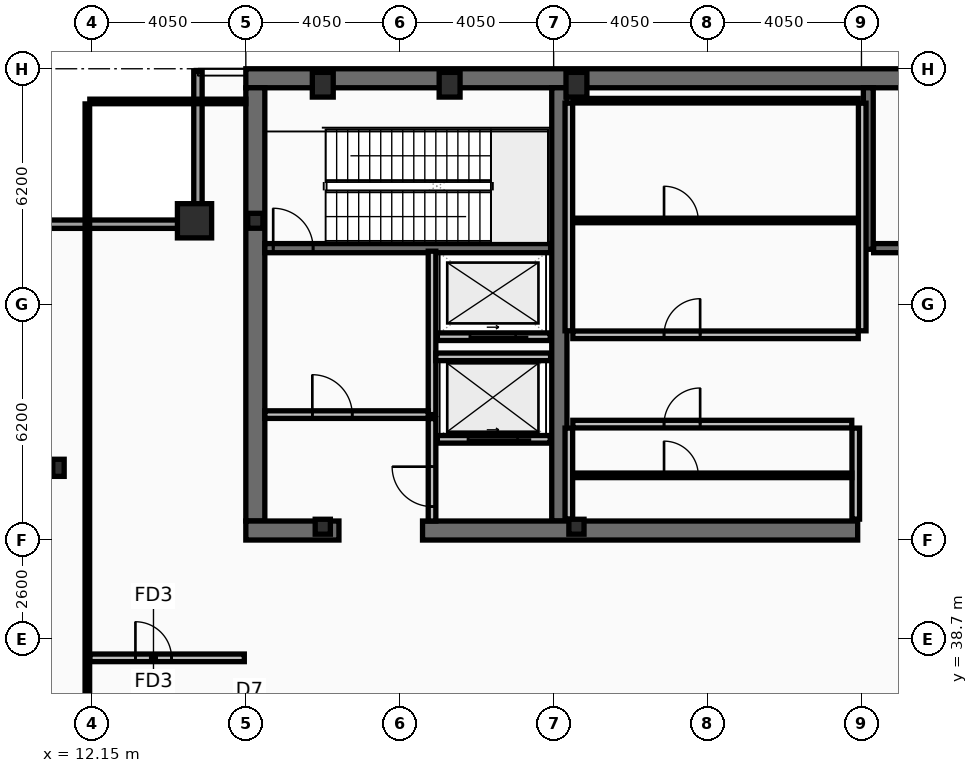
"""IFC4 building model, lengths in metres.
Left out: names, types, materials, properties, quantities, classifications, styles, units other than length and angle.
Written with IfcOpenShell. Run it as: python <this file> out.ifc"""

import sys

from ifc_helpers import new_model, si_unit, direction, frame, frame_2d, origin, origin_2d, place, context, subcontext, project, spatial, rectangle, hollow_rectangle, i_section, extrude, element, fill, save


model = new_model("IFC4")
c1 = context("Model", 3, precision=1e-05, world=origin(), true_north=direction((0.0, 1.0)))
c2 = subcontext(c1, "Body", "Model", "MODEL_VIEW")
j1 = project(units=[si_unit("LENGTHUNIT", "METRE"), si_unit("PLANEANGLEUNIT", "RADIAN")], contexts=[c1])
p1 = place(None, origin())
s1 = spatial("IfcSite", under=j1, at=p1, CompositionType="ELEMENT")
p2 = place(p1, origin())
s2 = spatial("IfcBuilding", under=s1, at=p2, CompositionType="ELEMENT")
p3 = place(p2, frame((0.0, 0.0, 350.6)))
s3 = spatial("IfcBuildingStorey", under=s2, at=p3, CompositionType="ELEMENT", Elevation=350.6)
p4 = place(p3, frame((16.2, 53.45, 0.0), z_axis=(0.0, 0.0, 1.0), x_axis=(1.0, 0.0, 0.0)))
e1 = element("IfcWall", 1, at=p4, inside=s3, PredefinedType="SHEAR", context=c2, shape_type="SweptSolid", body=[
    extrude(rectangle(XDim=40.5, YDim=0.5, at=frame_2d((20.25, 0.0))), origin(), (0.0, 0.0, 1.0), 5.4),
])
p5 = place(p3, frame((16.45, 41.8, 0.0), z_axis=(0.0, 0.0, 1.0), x_axis=(0.0, 1.0, 0.0)))
e2 = element("IfcWall", 2, at=p5, inside=s3, PredefinedType="SHEAR", context=c2, shape_type="SweptSolid", body=[
    extrude(rectangle(XDim=11.4, YDim=0.5, at=frame_2d((5.7, 0.0))), origin(), (0.0, 0.0, 1.0), 5.4),
])
p6 = place(p3, frame((24.45, 41.8, 0.0), z_axis=(0.0, 0.0, 1.0), x_axis=(0.0, 1.0, 0.0)))
e3 = element("IfcWall", 3, at=p6, inside=s3, PredefinedType="SHEAR", context=c2, shape_type="SweptSolid", body=[
    extrude(rectangle(XDim=11.4, YDim=0.4, at=frame_2d((5.7, 0.0))), origin(), (0.0, 0.0, 1.0), 5.4),
])
p7 = place(p3, frame((18.65, 41.55, 0.0), z_axis=(0.0, 0.0, 1.0), x_axis=(-1.0, 0.0, 0.0)))
e4 = element("IfcWall", 4, at=p7, inside=s3, PredefinedType="SHEAR", context=c2, shape_type="SweptSolid", body=[
    extrude(rectangle(XDim=2.45, YDim=0.5, at=frame_2d((1.225, 0.0))), origin(), (0.0, 0.0, 1.0), 5.4),
])
p8 = place(p3, frame((32.3, 41.55, 0.0), z_axis=(0.0, 0.0, 1.0), x_axis=(-1.0, 0.0, 0.0)))
e5 = element("IfcWall", 5, at=p8, inside=s3, PredefinedType="SHEAR", context=c2, shape_type="SweptSolid", body=[
    extrude(rectangle(XDim=11.45, YDim=0.5, at=frame_2d((5.725, 0.0))), origin(), (0.0, 0.0, 1.0), 5.4),
])
p9 = place(p3, frame((32.58, 48.95, 0.0), z_axis=(0.0, 0.0, 1.0), x_axis=(0.0, 1.0, 0.0)))
e6 = element("IfcWall", 6, at=p9, inside=s3, PredefinedType="SHEAR", context=c2, shape_type="SweptSolid", body=[
    extrude(rectangle(XDim=4.25, YDim=0.26, at=frame_2d((2.125, 0.0))), origin(), (0.0, 0.0, 1.0), 5.4),
])
p10 = place(p3, frame((16.7, 48.98, 0.0), z_axis=(0.0, 0.0, 1.0), x_axis=(1.0, 0.0, 0.0)))
e7 = element("IfcWall", 7, at=p10, inside=s3, PredefinedType="SHEAR", context=c2, shape_type="SweptSolid", body=[
    extrude(rectangle(XDim=7.52, YDim=0.24, at=frame_2d((3.76, 0.0))), origin(), (0.0, 0.0, 1.0), 5.4),
])
p11 = place(p10, frame((0.22, 0.0, 0.0)))
e8 = element("IfcOpeningElement", 8, at=p11, cuts=e7, PredefinedType="OPENING", context=c2, shape_type="SweptSolid", body=[
    extrude(rectangle(XDim=1.05, YDim=2.15, at=frame_2d((0.525, 1.075))), frame((0.0, 0.13, 0.0), z_axis=(0.0, -1.0, 0.0), x_axis=(1.0, 0.0, 0.0)), (0.0, 0.0, 1.0), 0.26),
])
p12 = place(p3, frame((32.72, 48.98, 0.0), z_axis=(0.0, 0.0, 1.0), x_axis=(1.0, 0.0, 0.0)))
e9 = element("IfcWall", 9, at=p12, inside=s3, PredefinedType="SHEAR", context=c2, shape_type="SweptSolid", body=[
    extrude(rectangle(XDim=7.56, YDim=0.24, at=frame_2d((3.78, 0.0))), origin(), (0.0, 0.0, 1.0), 5.4),
])
p13 = place(p12, frame((1.4, 0.0, 0.0)))
e10 = element("IfcOpeningElement", 10, at=p13, cuts=e9, PredefinedType="OPENING", context=c2, shape_type="SweptSolid", body=[
    extrude(rectangle(XDim=0.95, YDim=2.1, at=frame_2d((0.475, 1.05))), frame((0.0, 0.13, 0.0), z_axis=(0.0, -1.0, 0.0), x_axis=(1.0, 0.0, 0.0)), (0.0, 0.0, 1.0), 0.26),
])
p14 = place(p3, frame((14.85, 49.7, 0.0), z_axis=(0.0, 0.0, 1.0), x_axis=(1.0, 0.0, 0.0)))
e11 = element("IfcColumn", 11, at=p14, inside=s3, PredefinedType="COLUMN", context=c2, shape_type="SweptSolid", body=[
    extrude(hollow_rectangle(XDim=0.9, YDim=0.9, WallThickness=0.05, at=origin_2d()), origin(), (0.0, 0.0, 1.0), 5.6),
])
for number, where, z_axis, x_axis in (
    (12, (18.225, 53.28, 0.0), (0.0, 0.0, 1.0), (1.0, 0.0, 0.0)),
    (13, (21.562, 53.28, 0.0), (0.0, 0.0, 1.0), (1.0, 0.0, 0.0)),
    (14, (24.9, 53.28, 0.0), (0.0, 0.0, 1.0), (1.0, 0.0, 0.0)),
):
    element("IfcColumn", number, at=place(p3, frame(where, z_axis=z_axis, x_axis=x_axis)), inside=s3, PredefinedType="COLUMN", context=c2, shape_type="SweptSolid", body=[
        extrude(hollow_rectangle(XDim=0.55, YDim=0.65, WallThickness=0.04, at=origin_2d()), origin(), (0.0, 0.0, 1.0), 5.6),
    ])
p15 = place(p3, frame((11.27, 43.2, 0.0), z_axis=(0.0, 0.0, 1.0), x_axis=(1.0, 0.0, 0.0)))
e15 = element("IfcColumn", 15, at=p15, inside=s3, PredefinedType="COLUMN", context=c2, shape_type="SweptSolid", body=[
    extrude(i_section(OverallWidth=0.3, OverallDepth=0.45, WebThickness=0.014, FlangeThickness=0.026, at=origin_2d()), origin(), (0.0, 0.0, 1.0), 5.6),
])
for number, where, z_axis, x_axis in (
    (16, (16.45, 49.7, 0.0), (0.0, 0.0, 1.0), (1.0, 0.0, 0.0)),
    (17, (18.225, 41.65, 0.0), (0.0, 0.0, 1.0), (1.0, 0.0, 0.0)),
    (18, (24.9, 41.65, 0.0), (0.0, 0.0, 1.0), (1.0, 0.0, 0.0)),
):
    element("IfcColumn", number, at=place(p3, frame(where, z_axis=z_axis, x_axis=x_axis)), inside=s3, PredefinedType="COLUMN", context=c2, shape_type="SweptSolid", body=[
        extrude(i_section(OverallWidth=0.399, OverallDepth=0.393, WebThickness=0.023, FlangeThickness=0.037, at=origin_2d()), origin(), (0.0, 0.0, 1.0), 5.6),
    ])
p16 = place(p3, frame((10.92, 49.61, 0.0), z_axis=(0.0, 0.0, 1.0), x_axis=(1.0, 0.0, 0.0)))
e19 = element("IfcWall", 19, at=p16, inside=s3, PredefinedType="SOLIDWALL", context=c2, shape_type="SweptSolid", body=[
    extrude(rectangle(XDim=4.13, YDim=0.22, at=frame_2d((2.065, 0.0))), origin(), (0.0, 0.0, 1.0), 4.84),
])
p17 = place(p3, frame((14.94, 49.72, 0.0), z_axis=(0.0, 0.0, 1.0), x_axis=(0.0, 1.0, 0.0)))
e20 = element("IfcWall", 20, at=p17, inside=s3, PredefinedType="SOLIDWALL", context=c2, shape_type="SweptSolid", body=[
    extrude(rectangle(XDim=3.91, YDim=0.22, at=frame_2d((1.955, 0.0))), origin(), (0.0, 0.0, 1.0), 4.84),
])
p18 = place(p3, frame((24.21, 43.95, 0.0), z_axis=(0.0, 0.0, 1.0), x_axis=(-1.0, 0.0, 0.0)))
e21 = element("IfcWall", 21, at=p18, inside=s3, PredefinedType="PARTITIONING", context=c2, shape_type="SweptSolid", body=[
    extrude(rectangle(XDim=2.97, YDim=0.2, at=frame_2d((1.485, 0.0))), origin(), (0.0, 0.0, 1.0), 5.4),
])
p19 = place(p18, frame((0.86, 0.0, 0.0)))
e22 = element("IfcOpeningElement", 22, at=p19, cuts=e21, PredefinedType="OPENING", context=c2, shape_type="SweptSolid", body=[
    extrude(rectangle(XDim=1.3, YDim=2.18, at=frame_2d((0.65, 1.09))), frame((0.0, 0.11, 0.0), z_axis=(0.0, -1.0, 0.0), x_axis=(1.0, 0.0, 0.0)), (0.0, 0.0, 1.0), 0.22),
])
p20 = place(p3, frame((24.21, 46.65, 0.0), z_axis=(0.0, 0.0, 1.0), x_axis=(-1.0, 0.0, 0.0)))
e23 = element("IfcWall", 23, at=p20, inside=s3, PredefinedType="PARTITIONING", context=c2, shape_type="SweptSolid", body=[
    extrude(rectangle(XDim=2.97, YDim=0.2, at=frame_2d((1.485, 0.0))), origin(), (0.0, 0.0, 1.0), 5.4),
])
p21 = place(p20, frame((0.91, 0.0, 0.0)))
e24 = element("IfcOpeningElement", 24, at=p21, cuts=e23, PredefinedType="OPENING", context=c2, shape_type="SweptSolid", body=[
    extrude(rectangle(XDim=1.2, YDim=2.18, at=frame_2d((0.6, 1.09))), frame((0.0, 0.11, 0.0), z_axis=(0.0, -1.0, 0.0), x_axis=(1.0, 0.0, 0.0)), (0.0, 0.0, 1.0), 0.22),
])
p22 = place(p3, frame((21.1, 44.6, 0.0), z_axis=(0.0, 0.0, 1.0), x_axis=(0.0, 1.0, 0.0)))
e25 = element("IfcWall", 25, at=p22, inside=s3, PredefinedType="PARTITIONING", context=c2, shape_type="SweptSolid", body=[
    extrude(rectangle(XDim=4.3, YDim=0.2, at=frame_2d((2.15, 0.0))), origin(), (0.0, 0.0, 1.0), 5.4),
])
p23 = place(p3, frame((16.7, 44.6, 0.0), z_axis=(0.0, 0.0, 1.0), x_axis=(1.0, 0.0, 0.0)))
e26 = element("IfcWall", 26, at=p23, inside=s3, PredefinedType="PARTITIONING", context=c2, shape_type="SweptSolid", body=[
    extrude(rectangle(XDim=4.3, YDim=0.2, at=frame_2d((2.15, 0.0))), origin(), (0.0, 0.0, 1.0), 5.4),
])
p24 = place(p23, frame((1.25, 0.0, 0.0)))
e27 = element("IfcOpeningElement", 27, at=p24, cuts=e26, PredefinedType="OPENING", context=c2, shape_type="SweptSolid", body=[
    extrude(rectangle(XDim=1.05, YDim=2.15, at=frame_2d((0.525, 1.075))), frame((0.0, 0.11, 0.0), z_axis=(0.0, -1.0, 0.0), x_axis=(1.0, 0.0, 0.0)), (0.0, 0.0, 1.0), 0.22),
])
p25 = place(p3, frame((21.2, 46.12, 0.0), z_axis=(0.0, 0.0, 1.0), x_axis=(1.0, 0.0, 0.0)))
e28 = element("IfcWall", 28, at=p25, inside=s3, PredefinedType="PARTITIONING", context=c2, shape_type="SweptSolid", body=[
    extrude(rectangle(XDim=3.02, YDim=0.2, at=frame_2d((1.51, 0.0))), origin(), (0.0, 0.0, 1.0), 5.4),
])
p26 = place(p3, frame((21.1, 41.8, 0.0), z_axis=(0.0, 0.0, 1.0), x_axis=(0.0, 1.0, 0.0)))
e29 = element("IfcWall", 29, at=p26, inside=s3, PredefinedType="PARTITIONING", context=c2, shape_type="SweptSolid", body=[
    extrude(rectangle(XDim=2.695, YDim=0.2, at=frame_2d((1.348, 0.0))), origin(), (0.0, 0.0, 1.0), 5.4),
])
p27 = place(p26, frame((0.38, 0.0, 0.0)))
e30 = element("IfcOpeningElement", 30, at=p27, cuts=e29, PredefinedType="OPENING", context=c2, shape_type="SweptSolid", body=[
    extrude(rectangle(XDim=1.05, YDim=2.15, at=frame_2d((0.525, 1.075))), frame((0.0, 0.11, 0.0), z_axis=(0.0, -1.0, 0.0), x_axis=(1.0, 0.0, 0.0)), (0.0, 0.0, 1.0), 0.22),
])
for number, where, z_axis, x_axis in (
    (31, (24.7, 46.805, 0.0), (0.0, 0.0, 1.0), (0.0, 1.0, 0.0)),
    (32, (32.42, 46.805, 0.0), (0.0, 0.0, 1.0), (0.0, 1.0, 0.0)),
):
    element("IfcWall", number, at=place(p3, frame(where, z_axis=z_axis, x_axis=x_axis)), inside=s3, PredefinedType="PARTITIONING", context=c2, shape_type="SweptSolid", body=[
        extrude(rectangle(XDim=5.99, YDim=0.2, at=frame_2d((2.995, 0.0))), origin(), (0.0, 0.0, 1.0), 5.4),
    ])
p28 = place(p3, frame((24.805, 52.86, 0.0), z_axis=(0.0, 0.0, 1.0), x_axis=(1.0, 0.0, 0.0)))
e33 = element("IfcWall", 33, at=p28, inside=s3, PredefinedType="PARTITIONING", context=c2, shape_type="SweptSolid", body=[
    extrude(rectangle(XDim=7.51, YDim=0.12, at=frame_2d((3.755, 0.0))), origin(), (0.0, 0.0, 1.0), 5.4),
])
p29 = place(p3, frame((24.805, 49.709, 0.0), z_axis=(0.0, 0.0, 1.0), x_axis=(1.0, 0.0, 0.0)))
e34 = element("IfcWall", 34, at=p29, inside=s3, PredefinedType="PARTITIONING", context=c2, shape_type="SweptSolid", body=[
    extrude(rectangle(XDim=7.51, YDim=0.12, at=frame_2d((3.755, 0.0))), origin(), (0.0, 0.0, 1.0), 5.4),
])
p30 = place(p29, frame((2.4, 0.0, 0.0)))
e35 = element("IfcOpeningElement", 35, at=p30, cuts=e34, PredefinedType="OPENING", context=c2, shape_type="SweptSolid", body=[
    extrude(rectangle(XDim=0.9, YDim=2.05, at=frame_2d((0.45, 1.025))), frame((0.0, 0.07, 0.0), z_axis=(0.0, -1.0, 0.0), x_axis=(1.0, 0.0, 0.0)), (0.0, 0.0, 1.0), 0.14),
])
p31 = place(p3, frame((24.805, 46.7, 0.0), z_axis=(0.0, 0.0, 1.0), x_axis=(1.0, 0.0, 0.0)))
e36 = element("IfcWall", 36, at=p31, inside=s3, PredefinedType="PARTITIONING", context=c2, shape_type="SweptSolid", body=[
    extrude(rectangle(XDim=7.51, YDim=0.2, at=frame_2d((3.755, 0.0))), origin(), (0.0, 0.0, 1.0), 5.4),
])
p32 = place(p31, frame((2.4, 0.0, 0.0)))
e37 = element("IfcOpeningElement", 37, at=p32, cuts=e36, PredefinedType="OPENING", context=c2, shape_type="SweptSolid", body=[
    extrude(rectangle(XDim=0.95, YDim=2.1, at=frame_2d((0.475, 1.05))), frame((0.0, 0.11, 0.0), z_axis=(0.0, -1.0, 0.0), x_axis=(1.0, 0.0, 0.0)), (0.0, 0.0, 1.0), 0.22),
])
for number, where, z_axis, x_axis in (
    (38, (24.7, 41.85, 0.0), (0.0, 0.0, 1.0), (0.0, 1.0, 0.0)),
    (39, (32.25, 41.85, 0.0), (0.0, 0.0, 1.0), (0.0, 1.0, 0.0)),
):
    element("IfcWall", number, at=place(p3, frame(where, z_axis=z_axis, x_axis=x_axis)), inside=s3, PredefinedType="PARTITIONING", context=c2, shape_type="SweptSolid", body=[
        extrude(rectangle(XDim=2.395, YDim=0.2, at=frame_2d((1.198, 0.0))), origin(), (0.0, 0.0, 1.0), 5.4),
    ])
p33 = place(p3, frame((24.805, 43.002, 0.0), z_axis=(0.0, 0.0, 1.0), x_axis=(1.0, 0.0, 0.0)))
e40 = element("IfcWall", 40, at=p33, inside=s3, PredefinedType="PARTITIONING", context=c2, shape_type="SweptSolid", body=[
    extrude(rectangle(XDim=7.34, YDim=0.12, at=frame_2d((3.67, 0.0))), origin(), (0.0, 0.0, 1.0), 5.4),
])
p34 = place(p33, frame((2.4, 0.0, 0.0)))
e41 = element("IfcOpeningElement", 41, at=p34, cuts=e40, PredefinedType="OPENING", context=c2, shape_type="SweptSolid", body=[
    extrude(rectangle(XDim=0.9, YDim=2.05, at=frame_2d((0.45, 1.025))), frame((0.0, 0.07, 0.0), z_axis=(0.0, -1.0, 0.0), x_axis=(1.0, 0.0, 0.0)), (0.0, 0.0, 1.0), 0.14),
])
p35 = place(p3, frame((24.805, 44.35, 0.0), z_axis=(0.0, 0.0, 1.0), x_axis=(1.0, 0.0, 0.0)))
e42 = element("IfcWall", 42, at=p35, inside=s3, PredefinedType="PARTITIONING", context=c2, shape_type="SweptSolid", body=[
    extrude(rectangle(XDim=7.34, YDim=0.2, at=frame_2d((3.67, 0.0))), origin(), (0.0, 0.0, 1.0), 5.4),
])
p36 = place(p35, frame((2.4, 0.0, 0.0)))
e43 = element("IfcOpeningElement", 43, at=p36, cuts=e42, PredefinedType="OPENING", context=c2, shape_type="SweptSolid", body=[
    extrude(rectangle(XDim=0.95, YDim=2.1, at=frame_2d((0.475, 1.05))), frame((0.0, 0.11, 0.0), z_axis=(0.0, -1.0, 0.0), x_axis=(1.0, 0.0, 0.0)), (0.0, 0.0, 1.0), 0.22),
])
p37 = place(p3, frame((12.095, 38.2, 0.0), z_axis=(0.0, 0.0, 1.0), x_axis=(1.0, 0.0, 0.0)))
e44 = element("IfcWall", 44, at=p37, inside=s3, PredefinedType="PARTITIONING", context=c2, shape_type="SweptSolid", body=[
    extrude(rectangle(XDim=4.065, YDim=0.2, at=frame_2d((2.032, 0.0))), origin(), (0.0, 0.0, 1.0), 5.4),
])
p38 = place(p37, frame((1.2, 0.0, 0.0)))
e45 = element("IfcOpeningElement", 45, at=p38, cuts=e44, PredefinedType="OPENING", context=c2, shape_type="SweptSolid", body=[
    extrude(rectangle(XDim=0.95, YDim=2.1, at=frame_2d((0.475, 1.05))), frame((0.0, 0.11, 0.0), z_axis=(0.0, -1.0, 0.0), x_axis=(1.0, 0.0, 0.0)), (0.0, 0.0, 1.0), 0.22),
])
p39 = place(p3, frame((12.03, 10.665, 0.0), z_axis=(0.0, 0.0, 1.0), x_axis=(0.0, 1.0, 0.0)))
e46 = element("IfcWall", 46, at=p39, inside=s3, PredefinedType="PARTITIONING", context=c2, shape_type="SweptSolid", body=[
    extrude(rectangle(XDim=42.11, YDim=0.12, at=frame_2d((21.055, 0.0))), origin(), (0.0, 0.0, 1.0), 4.79),
])
p40 = place(p3, frame((12.095, 52.84, 0.0), z_axis=(0.0, 0.0, 1.0), x_axis=(1.0, 0.0, 0.0)))
e47 = element("IfcWall", 47, at=p40, inside=s3, PredefinedType="PARTITIONING", context=c2, shape_type="SweptSolid", body=[
    extrude(rectangle(XDim=4.105, YDim=0.12, at=frame_2d((2.052, 0.0))), origin(), (0.0, 0.0, 1.0), 5.4),
])
p41 = place(p11, origin())
e48 = element("IfcDoor", 48, at=p41, inside=s3, OperationType="SINGLE_SWING_LEFT", PredefinedType="DOOR", context=c2, shape_type="SweptSolid", body=[
    extrude(rectangle(XDim=1.05, YDim=2.15, at=frame_2d((0.525, 1.075))), frame((0.0, 0.025, 0.0), z_axis=(0.0, -1.0, 0.0), x_axis=(1.0, 0.0, 0.0)), (0.0, 0.0, 1.0), 0.05),
])
fill(e8, e48)
p42 = place(p19, origin())
e49 = element("IfcDoor", 49, at=p42, inside=s3, OperationType="SLIDING_TO_LEFT", PredefinedType="DOOR", context=c2, shape_type="SweptSolid", body=[
    extrude(rectangle(XDim=1.3, YDim=2.18, at=frame_2d((0.65, 1.09))), frame((0.0, 0.025, 0.0), z_axis=(0.0, -1.0, 0.0), x_axis=(1.0, 0.0, 0.0)), (0.0, 0.0, 1.0), 0.05),
])
fill(e22, e49)
p43 = place(p21, origin())
e50 = element("IfcDoor", 50, at=p43, inside=s3, OperationType="SLIDING_TO_LEFT", PredefinedType="DOOR", context=c2, shape_type="SweptSolid", body=[
    extrude(rectangle(XDim=1.2, YDim=2.18, at=frame_2d((0.6, 1.09))), frame((0.0, 0.025, 0.0), z_axis=(0.0, -1.0, 0.0), x_axis=(1.0, 0.0, 0.0)), (0.0, 0.0, 1.0), 0.05),
])
fill(e24, e50)
p44 = place(p24, origin())
e51 = element("IfcDoor", 51, at=p44, inside=s3, OperationType="SINGLE_SWING_LEFT", PredefinedType="DOOR", context=c2, shape_type="SweptSolid", body=[
    extrude(rectangle(XDim=1.05, YDim=2.15, at=frame_2d((0.525, 1.075))), frame((0.0, 0.025, 0.0), z_axis=(0.0, -1.0, 0.0), x_axis=(1.0, 0.0, 0.0)), (0.0, 0.0, 1.0), 0.05),
])
fill(e27, e51)
p45 = place(p27, origin())
e52 = element("IfcDoor", 52, at=p45, inside=s3, OperationType="SINGLE_SWING_RIGHT", PredefinedType="DOOR", context=c2, shape_type="SweptSolid", body=[
    extrude(rectangle(XDim=1.05, YDim=2.15, at=frame_2d((0.525, 1.075))), frame((0.0, 0.025, 0.0), z_axis=(0.0, -1.0, 0.0), x_axis=(1.0, 0.0, 0.0)), (0.0, 0.0, 1.0), 0.05),
])
fill(e30, e52)
p46 = place(p30, origin())
e53 = element("IfcDoor", 53, at=p46, inside=s3, OperationType="SINGLE_SWING_LEFT", PredefinedType="DOOR", context=c2, shape_type="SweptSolid", body=[
    extrude(rectangle(XDim=0.9, YDim=2.05, at=frame_2d((0.45, 1.025))), frame((0.0, 0.025, 0.0), z_axis=(0.0, -1.0, 0.0), x_axis=(1.0, 0.0, 0.0)), (0.0, 0.0, 1.0), 0.05),
])
fill(e35, e53)
p47 = place(p32, origin())
e54 = element("IfcDoor", 54, at=p47, inside=s3, OperationType="SINGLE_SWING_RIGHT", PredefinedType="DOOR", context=c2, shape_type="SweptSolid", body=[
    extrude(rectangle(XDim=0.95, YDim=2.1, at=frame_2d((0.475, 1.05))), frame((0.0, 0.025, 0.0), z_axis=(0.0, -1.0, 0.0), x_axis=(1.0, 0.0, 0.0)), (0.0, 0.0, 1.0), 0.05),
])
fill(e37, e54)
p48 = place(p34, origin())
e55 = element("IfcDoor", 55, at=p48, inside=s3, OperationType="SINGLE_SWING_LEFT", PredefinedType="DOOR", context=c2, shape_type="SweptSolid", body=[
    extrude(rectangle(XDim=0.9, YDim=2.05, at=frame_2d((0.45, 1.025))), frame((0.0, 0.025, 0.0), z_axis=(0.0, -1.0, 0.0), x_axis=(1.0, 0.0, 0.0)), (0.0, 0.0, 1.0), 0.05),
])
fill(e41, e55)
p49 = place(p36, origin())
e56 = element("IfcDoor", 56, at=p49, inside=s3, OperationType="SINGLE_SWING_RIGHT", PredefinedType="DOOR", context=c2, shape_type="SweptSolid", body=[
    extrude(rectangle(XDim=0.95, YDim=2.1, at=frame_2d((0.475, 1.05))), frame((0.0, 0.025, 0.0), z_axis=(0.0, -1.0, 0.0), x_axis=(1.0, 0.0, 0.0)), (0.0, 0.0, 1.0), 0.05),
])
fill(e43, e56)
p50 = place(p38, origin())
e57 = element("IfcDoor", 57, at=p50, inside=s3, OperationType="SINGLE_SWING_LEFT", PredefinedType="DOOR", context=c2, shape_type="SweptSolid", body=[
    extrude(rectangle(XDim=0.95, YDim=2.1, at=frame_2d((0.475, 1.05))), frame((0.0, 0.025, 0.0), z_axis=(0.0, -1.0, 0.0), x_axis=(1.0, 0.0, 0.0)), (0.0, 0.0, 1.0), 0.05),
])
fill(e45, e57)
save(model, sys.argv[1])
